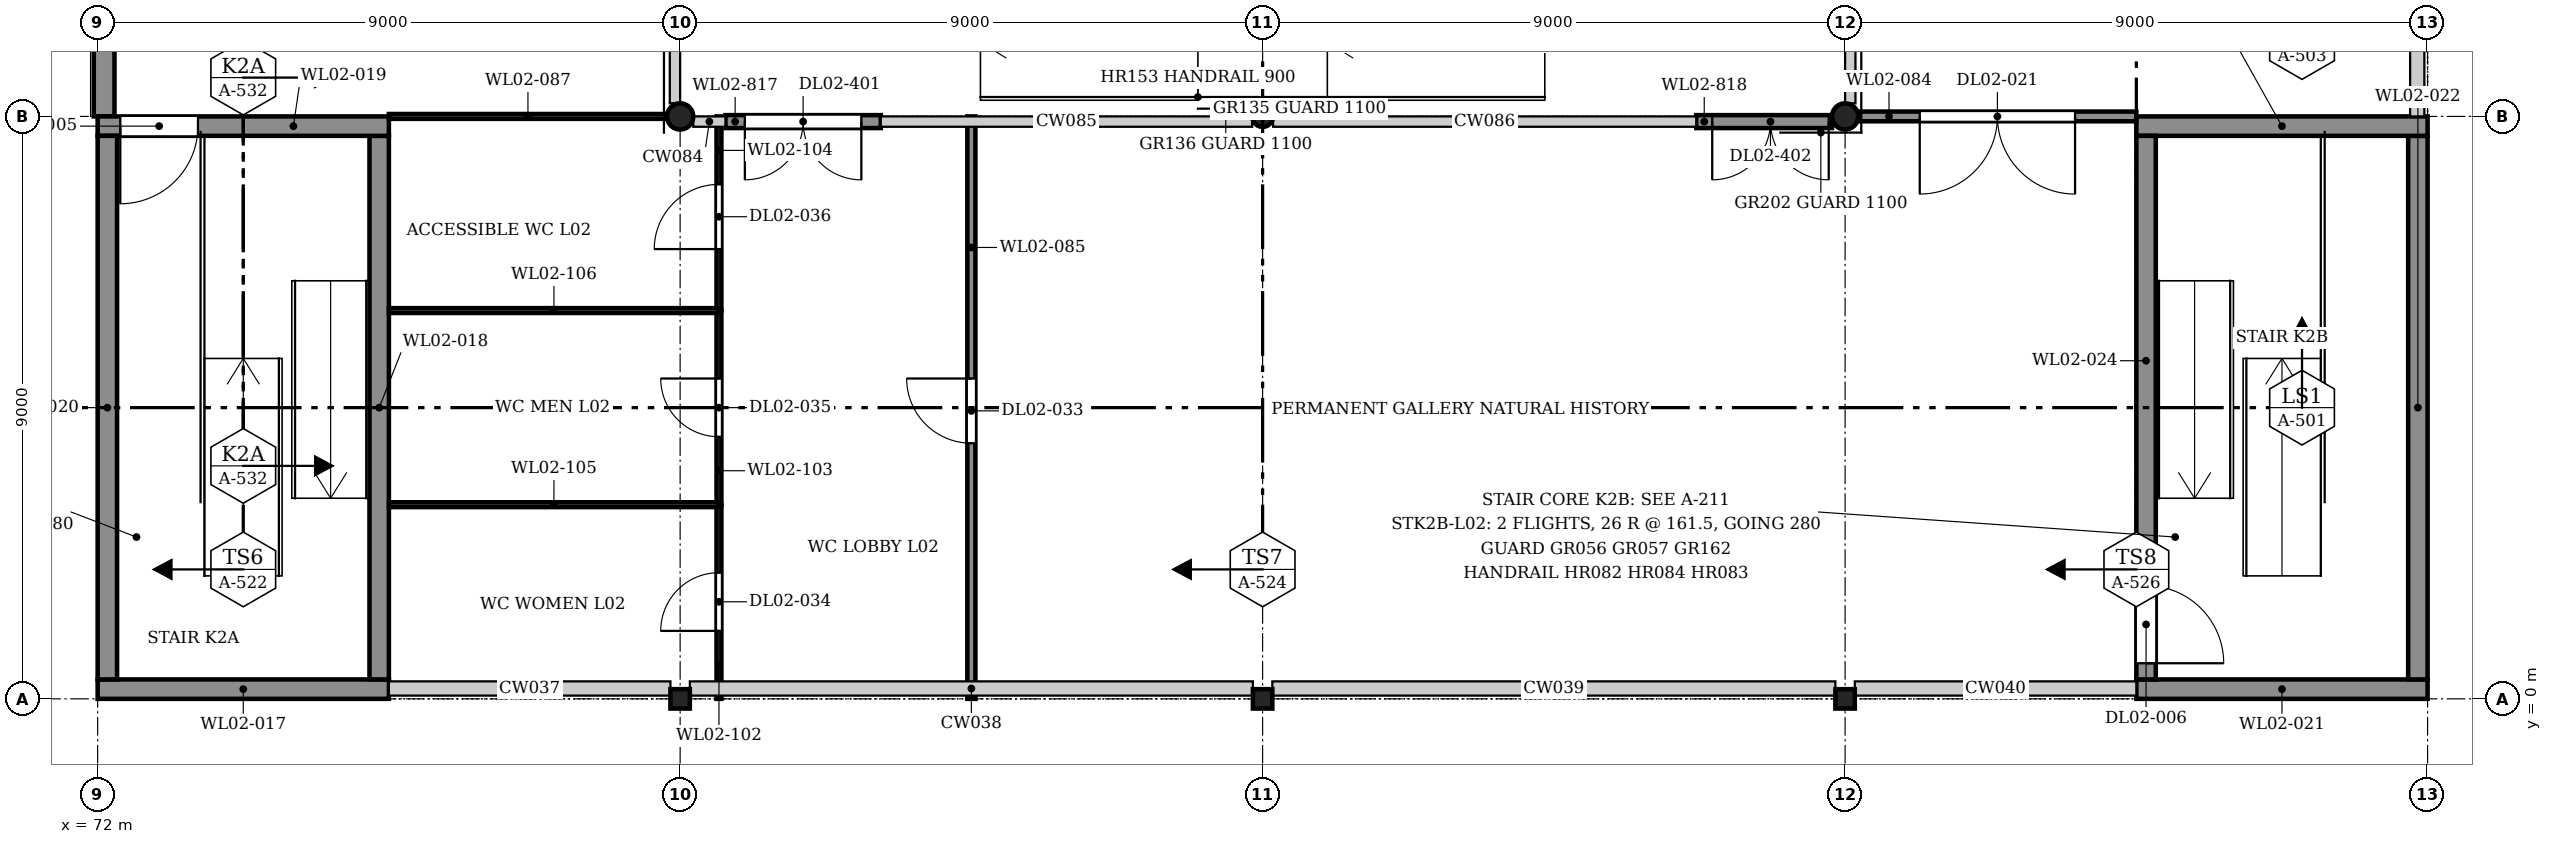
"""IFC4 building model, lengths in metres.
Left out: names, types, materials, properties, quantities, classifications, styles, units other than length and angle.
Written with IfcOpenShell. Run it as: python <this file> out.ifc"""

import sys

from ifc_helpers import new_model, si_unit, direction, frame, frame_2d, origin, origin_2d, place, context, subcontext, project, spatial, rectangle, hollow_rectangle, hollow_circle, extrude, element, fill, save


model = new_model("IFC4")
c1 = context("Model", 3, precision=1e-05, world=origin(), true_north=direction((0.0, 1.0)))
c2 = subcontext(c1, "Body", "Model", "MODEL_VIEW")
j1 = project(units=[si_unit("LENGTHUNIT", "METRE"), si_unit("PLANEANGLEUNIT", "RADIAN")], contexts=[c1])
p1 = place(None, origin())
s1 = spatial("IfcSite", under=j1, at=p1, CompositionType="ELEMENT")
p2 = place(p1, origin())
s2 = spatial("IfcBuilding", under=s1, at=p2, CompositionType="ELEMENT")
p3 = place(p2, frame((0.0, 0.0, 9.2)))
s3 = spatial("IfcBuildingStorey", under=s2, at=p3, CompositionType="ELEMENT", Elevation=9.2)
p4 = place(p3, frame((81.0, 0.0, 0.0), z_axis=(0.0, 0.0, 1.0), x_axis=(1.0, 0.0, 0.0)))
e1 = element("IfcColumn", 1, at=p4, inside=s3, PredefinedType="COLUMN", context=c2, shape_type="SweptSolid", body=[
    extrude(hollow_rectangle(XDim=0.3, YDim=0.3, WallThickness=0.016, InnerFilletRadius=0.024, OuterFilletRadius=0.04, at=origin_2d()), origin(), (0.0, 0.0, 1.0), 4.2),
])
p5 = place(p3, frame((90.0, 0.0, 0.0), z_axis=(0.0, 0.0, 1.0), x_axis=(1.0, 0.0, 0.0)))
e2 = element("IfcColumn", 2, at=p5, inside=s3, PredefinedType="COLUMN", context=c2, shape_type="SweptSolid", body=[
    extrude(hollow_rectangle(XDim=0.3, YDim=0.3, WallThickness=0.01, InnerFilletRadius=0.015, OuterFilletRadius=0.025, at=origin_2d()), origin(), (0.0, 0.0, 1.0), 4.2),
])
p6 = place(p3, frame((99.0, 0.0, 0.0), z_axis=(0.0, 0.0, 1.0), x_axis=(1.0, 0.0, 0.0)))
e3 = element("IfcColumn", 3, at=p6, inside=s3, PredefinedType="COLUMN", context=c2, shape_type="SweptSolid", body=[
    extrude(hollow_rectangle(XDim=0.3, YDim=0.3, WallThickness=0.016, InnerFilletRadius=0.024, OuterFilletRadius=0.04, at=origin_2d()), origin(), (0.0, 0.0, 1.0), 4.2),
])
p7 = place(p3, frame((81.0, 9.0, 0.0), z_axis=(0.0, 0.0, 1.0), x_axis=(1.0, 0.0, 0.0)))
e4 = element("IfcColumn", 4, at=p7, inside=s3, PredefinedType="COLUMN", context=c2, shape_type="SweptSolid", body=[
    extrude(hollow_circle(Radius=0.203, WallThickness=0.013, at=origin_2d()), origin(), (0.0, 0.0, 1.0), 4.2),
])
p8 = place(p3, frame((90.0, 9.0, 0.0), z_axis=(0.0, 0.0, 1.0), x_axis=(1.0, 0.0, 0.0)))
e5 = element("IfcColumn", 5, at=p8, inside=s3, PredefinedType="COLUMN", context=c2, shape_type="SweptSolid", body=[
    extrude(hollow_circle(Radius=0.162, WallThickness=0.01, at=origin_2d()), origin(), (0.0, 0.0, 1.0), 4.2),
])
p9 = place(p3, frame((99.0, 9.0, 0.0), z_axis=(0.0, 0.0, 1.0), x_axis=(1.0, 0.0, 0.0)))
e6 = element("IfcColumn", 6, at=p9, inside=s3, PredefinedType="COLUMN", context=c2, shape_type="SweptSolid", body=[
    extrude(hollow_circle(Radius=0.203, WallThickness=0.013, at=origin_2d()), origin(), (0.0, 0.0, 1.0), 4.2),
])
p10 = place(p3, frame((72.1, 9.0, 0.0), z_axis=(0.0, 0.0, 1.0), x_axis=(0.0, 1.0, 0.0)))
e7 = element("IfcWall", 7, at=p10, inside=s3, PredefinedType="SOLIDWALL", context=c2, shape_type="SweptSolid", body=[
    extrude(rectangle(XDim=9.0, YDim=0.32, at=frame_2d((4.5, 0.0))), origin(), (0.0, 0.0, 1.0), 4.035),
])
p11 = place(p3, frame((81.7, 8.92, 0.0), z_axis=(0.0, 0.0, 1.0), x_axis=(1.0, 0.0, 0.0)))
e8 = element("IfcWall", 8, at=p11, inside=s3, PredefinedType="SOLIDWALL", context=c2, shape_type="SweptSolid", body=[
    extrude(rectangle(XDim=2.4, YDim=0.2, at=frame_2d((1.2, 0.0))), origin(), (0.0, 0.0, 1.0), 3.125),
])
p12 = place(p11, frame((0.3, 0.0, 0.0)))
e9 = element("IfcOpeningElement", 9, at=p12, cuts=e8, PredefinedType="OPENING", context=c2, shape_type="SweptSolid", body=[
    extrude(rectangle(XDim=1.8, YDim=2.4, at=frame_2d((0.9, 1.2))), frame((0.0, 0.11, 0.0), z_axis=(0.0, -1.0, 0.0), x_axis=(1.0, 0.0, 0.0)), (0.0, 0.0, 1.0), 0.22),
])
p13 = place(p3, frame((96.7, 8.92, 0.0), z_axis=(0.0, 0.0, 1.0), x_axis=(1.0, 0.0, 0.0)))
e10 = element("IfcWall", 10, at=p13, inside=s3, PredefinedType="SOLIDWALL", context=c2, shape_type="SweptSolid", body=[
    extrude(rectangle(XDim=2.097, YDim=0.2, at=frame_2d((1.048, 0.0))), origin(), (0.0, 0.0, 1.0), 3.125),
])
p14 = place(p13, frame((0.247, 0.0, 0.0)))
e11 = element("IfcOpeningElement", 11, at=p14, cuts=e10, PredefinedType="OPENING", context=c2, shape_type="SweptSolid", body=[
    extrude(rectangle(XDim=1.8, YDim=2.4, at=frame_2d((0.9, 1.2))), frame((0.0, 0.11, 0.0), z_axis=(0.0, -1.0, 0.0), x_axis=(1.0, 0.0, 0.0)), (0.0, 0.0, 1.0), 0.22),
])
p15 = place(p3, frame((72.0, 0.15, 0.0), z_axis=(0.0, 0.0, 1.0), x_axis=(1.0, 0.0, 0.0)))
e12 = element("IfcWall", 12, at=p15, inside=s3, PredefinedType="SOLIDWALL", context=c2, shape_type="SweptSolid", body=[
    extrude(rectangle(XDim=4.5, YDim=0.3, at=frame_2d((2.25, 0.0))), origin(), (0.0, 0.0, 1.0), 4.2),
])
p16 = place(p3, frame((76.35, 0.3, 0.0), z_axis=(0.0, 0.0, 1.0), x_axis=(0.0, 1.0, 0.0)))
e13 = element("IfcWall", 13, at=p16, inside=s3, PredefinedType="SOLIDWALL", context=c2, shape_type="SweptSolid", body=[
    extrude(rectangle(XDim=8.4, YDim=0.3, at=frame_2d((4.2, 0.0))), origin(), (0.0, 0.0, 1.0), 4.2),
])
p17 = place(p3, frame((72.0, 8.85, 0.0), z_axis=(0.0, 0.0, 1.0), x_axis=(1.0, 0.0, 0.0)))
e14 = element("IfcWall", 14, at=p17, inside=s3, PredefinedType="SOLIDWALL", context=c2, shape_type="SweptSolid", body=[
    extrude(rectangle(XDim=4.5, YDim=0.3, at=frame_2d((2.25, 0.0))), origin(), (0.0, 0.0, 1.0), 4.2),
])
p18 = place(p17, frame((0.35, 0.0, 0.0)))
e15 = element("IfcOpeningElement", 15, at=p18, cuts=e14, PredefinedType="OPENING", context=c2, shape_type="SweptSolid", body=[
    extrude(rectangle(XDim=1.2, YDim=2.1, at=frame_2d((0.6, 1.05))), frame((0.0, 0.16, 0.0), z_axis=(0.0, -1.0, 0.0), x_axis=(1.0, 0.0, 0.0)), (0.0, 0.0, 1.0), 0.32),
])
p19 = place(p3, frame((72.15, 0.3, 0.0), z_axis=(0.0, 0.0, 1.0), x_axis=(0.0, 1.0, 0.0)))
e16 = element("IfcWall", 16, at=p19, inside=s3, PredefinedType="SOLIDWALL", context=c2, shape_type="SweptSolid", body=[
    extrude(rectangle(XDim=8.4, YDim=0.3, at=frame_2d((4.2, 0.0))), origin(), (0.0, 0.0, 1.0), 4.2),
])
p20 = place(p3, frame((103.5, 0.15, 0.0), z_axis=(0.0, 0.0, 1.0), x_axis=(1.0, 0.0, 0.0)))
e17 = element("IfcWall", 17, at=p20, inside=s3, PredefinedType="SOLIDWALL", context=c2, shape_type="SweptSolid", body=[
    extrude(rectangle(XDim=4.5, YDim=0.3, at=frame_2d((2.25, 0.0))), origin(), (0.0, 0.0, 1.0), 4.2),
])
p21 = place(p3, frame((107.85, 0.3, 0.0), z_axis=(0.0, 0.0, 1.0), x_axis=(0.0, 1.0, 0.0)))
e18 = element("IfcWall", 18, at=p21, inside=s3, PredefinedType="SOLIDWALL", context=c2, shape_type="SweptSolid", body=[
    extrude(rectangle(XDim=8.4, YDim=0.3, at=frame_2d((4.2, 0.0))), origin(), (0.0, 0.0, 1.0), 4.2),
])
p22 = place(p3, frame((103.5, 8.85, 0.0), z_axis=(0.0, 0.0, 1.0), x_axis=(1.0, 0.0, 0.0)))
e19 = element("IfcWall", 19, at=p22, inside=s3, PredefinedType="SOLIDWALL", context=c2, shape_type="SweptSolid", body=[
    extrude(rectangle(XDim=4.5, YDim=0.3, at=frame_2d((2.25, 0.0))), origin(), (0.0, 0.0, 1.0), 4.2),
])
p23 = place(p3, frame((103.65, 0.3, 0.0), z_axis=(0.0, 0.0, 1.0), x_axis=(0.0, 1.0, 0.0)))
e20 = element("IfcWall", 20, at=p23, inside=s3, PredefinedType="SOLIDWALL", context=c2, shape_type="SweptSolid", body=[
    extrude(rectangle(XDim=8.4, YDim=0.3, at=frame_2d((4.2, 0.0))), origin(), (0.0, 0.0, 1.0), 4.2),
])
p24 = place(p23, frame((0.25, 0.0, 0.0)))
e21 = element("IfcOpeningElement", 21, at=p24, cuts=e20, PredefinedType="OPENING", context=c2, shape_type="SweptSolid", body=[
    extrude(rectangle(XDim=1.2, YDim=2.1, at=frame_2d((0.6, 1.05))), frame((0.0, 0.16, 0.0), z_axis=(0.0, -1.0, 0.0), x_axis=(1.0, 0.0, 0.0)), (0.0, 0.0, 1.0), 0.32),
])
p25 = place(p3, frame((99.203, 9.0, 0.0), z_axis=(0.0, 0.0, 1.0), x_axis=(1.0, 0.0, 0.0)))
e22 = element("IfcWall", 22, at=p25, inside=s3, PredefinedType="PARTITIONING", context=c2, shape_type="SweptSolid", body=[
    extrude(rectangle(XDim=4.297, YDim=0.15, at=frame_2d((2.148, 0.0))), origin(), (0.0, 0.0, 1.0), 3.502),
])
p26 = place(p25, frame((0.95, 0.0, 0.0)))
e23 = element("IfcOpeningElement", 23, at=p26, cuts=e22, PredefinedType="OPENING", context=c2, shape_type="SweptSolid", body=[
    extrude(rectangle(XDim=2.4, YDim=2.4, at=frame_2d((1.2, 1.2))), frame((0.0, 0.085, 0.0), z_axis=(0.0, -1.0, 0.0), x_axis=(1.0, 0.0, 0.0)), (0.0, 0.0, 1.0), 0.17),
])
p27 = place(p3, frame((85.5, 0.0, 0.0), z_axis=(0.0, 0.0, 1.0), x_axis=(0.0, 1.0, 0.0)))
e24 = element("IfcWall", 24, at=p27, inside=s3, PredefinedType="PARTITIONING", context=c2, shape_type="SweptSolid", body=[
    extrude(rectangle(XDim=9.0, YDim=0.125, at=frame_2d((4.5, 0.0))), origin(), (0.0, 0.0, 1.0), 3.428),
])
p28 = place(p27, frame((3.95, 0.0, 0.0)))
e25 = element("IfcOpeningElement", 25, at=p28, cuts=e24, PredefinedType="OPENING", context=c2, shape_type="SweptSolid", body=[
    extrude(rectangle(XDim=1.0, YDim=2.1, at=frame_2d((0.5, 1.05))), frame((0.0, 0.073, 0.0), z_axis=(0.0, -1.0, 0.0), x_axis=(1.0, 0.0, 0.0)), (0.0, 0.0, 1.0), 0.145),
])
p29 = place(p3, frame((76.5, 9.0, 0.0), z_axis=(0.0, 0.0, 1.0), x_axis=(1.0, 0.0, 0.0)))
e26 = element("IfcWall", 26, at=p29, inside=s3, PredefinedType="PARTITIONING", context=c2, shape_type="SweptSolid", body=[
    extrude(rectangle(XDim=4.297, YDim=0.075, at=frame_2d((2.148, 0.0))), origin(), (0.0, 0.0, 1.0), 3.502),
])
p30 = place(p3, frame((81.6, 0.0, 0.0), z_axis=(0.0, 0.0, 1.0), x_axis=(0.0, 1.0, 0.0)))
e27 = element("IfcWall", 27, at=p30, inside=s3, PredefinedType="PARTITIONING", context=c2, shape_type="SweptSolid", body=[
    extrude(rectangle(XDim=3.0, YDim=0.075, at=frame_2d((1.5, 0.0))), origin(), (0.0, 0.0, 1.0), 3.578),
])
p31 = place(p30, frame((1.05, 0.0, 0.0)))
e28 = element("IfcOpeningElement", 28, at=p31, cuts=e27, PredefinedType="OPENING", context=c2, shape_type="SweptSolid", body=[
    extrude(rectangle(XDim=0.9, YDim=2.1, at=frame_2d((0.45, 1.05))), frame((0.0, 0.047, 0.0), z_axis=(0.0, -1.0, 0.0), x_axis=(1.0, 0.0, 0.0)), (0.0, 0.0, 1.0), 0.095),
])
p32 = place(p3, frame((81.6, 3.0, 0.0), z_axis=(0.0, 0.0, 1.0), x_axis=(0.0, 1.0, 0.0)))
e29 = element("IfcWall", 29, at=p32, inside=s3, PredefinedType="PARTITIONING", context=c2, shape_type="SweptSolid", body=[
    extrude(rectangle(XDim=3.0, YDim=0.075, at=frame_2d((1.5, 0.0))), origin(), (0.0, 0.0, 1.0), 4.035),
])
p33 = place(p32, frame((1.05, 0.0, 0.0)))
e30 = element("IfcOpeningElement", 30, at=p33, cuts=e29, PredefinedType="OPENING", context=c2, shape_type="SweptSolid", body=[
    extrude(rectangle(XDim=0.9, YDim=2.1, at=frame_2d((0.45, 1.05))), frame((0.0, 0.047, 0.0), z_axis=(0.0, -1.0, 0.0), x_axis=(1.0, 0.0, 0.0)), (0.0, 0.0, 1.0), 0.095),
])
p34 = place(p3, frame((81.6, 6.0, 0.0), z_axis=(0.0, 0.0, 1.0), x_axis=(0.0, 1.0, 0.0)))
e31 = element("IfcWall", 31, at=p34, inside=s3, PredefinedType="PARTITIONING", context=c2, shape_type="SweptSolid", body=[
    extrude(rectangle(XDim=3.0, YDim=0.075, at=frame_2d((1.5, 0.0))), origin(), (0.0, 0.0, 1.0), 3.428),
])
p35 = place(p34, frame((0.95, 0.0, 0.0)))
e32 = element("IfcOpeningElement", 32, at=p35, cuts=e31, PredefinedType="OPENING", context=c2, shape_type="SweptSolid", body=[
    extrude(rectangle(XDim=1.0, YDim=2.1, at=frame_2d((0.5, 1.05))), frame((0.0, 0.047, 0.0), z_axis=(0.0, -1.0, 0.0), x_axis=(1.0, 0.0, 0.0)), (0.0, 0.0, 1.0), 0.095),
])
for number, where, z_axis, x_axis in (
    (33, (76.5, 3.0, 0.0), (0.0, 0.0, 1.0), (1.0, 0.0, 0.0)),
    (34, (76.5, 6.0, 0.0), (0.0, 0.0, 1.0), (1.0, 0.0, 0.0)),
):
    element("IfcWall", number, at=place(p3, frame(where, z_axis=z_axis, x_axis=x_axis)), inside=s3, PredefinedType="PARTITIONING", context=c2, shape_type="SweptSolid", body=[
        extrude(rectangle(XDim=5.1, YDim=0.075, at=frame_2d((2.55, 0.0))), origin(), (0.0, 0.0, 1.0), 3.502),
    ])
p36 = place(p12, frame((1.8, 0.0, 0.0), z_axis=(0.0, 0.0, 1.0), x_axis=(-1.0, 0.0, 0.0)))
e35 = element("IfcDoor", 35, at=p36, inside=s3, OperationType="DOUBLE_DOOR_SINGLE_SWING", PredefinedType="DOOR", context=c2, shape_type="SweptSolid", body=[
    extrude(rectangle(XDim=1.8, YDim=2.4, at=frame_2d((0.9, 1.2))), frame((0.0, 0.025, 0.0), z_axis=(0.0, -1.0, 0.0), x_axis=(1.0, 0.0, 0.0)), (0.0, 0.0, 1.0), 0.05),
])
fill(e9, e35)
p37 = place(p14, frame((1.8, 0.0, 0.0), z_axis=(0.0, 0.0, 1.0), x_axis=(-1.0, 0.0, 0.0)))
e36 = element("IfcDoor", 36, at=p37, inside=s3, OperationType="DOUBLE_DOOR_SINGLE_SWING", PredefinedType="DOOR", context=c2, shape_type="SweptSolid", body=[
    extrude(rectangle(XDim=1.8, YDim=2.4, at=frame_2d((0.9, 1.2))), frame((0.0, 0.025, 0.0), z_axis=(0.0, -1.0, 0.0), x_axis=(1.0, 0.0, 0.0)), (0.0, 0.0, 1.0), 0.05),
])
fill(e11, e36)
p38 = place(p18, frame((1.2, 0.0, 0.0), z_axis=(0.0, 0.0, 1.0), x_axis=(-1.0, 0.0, 0.0)))
e37 = element("IfcDoor", 37, at=p38, inside=s3, OperationType="SINGLE_SWING_LEFT", PredefinedType="DOOR", context=c2, shape_type="SweptSolid", body=[
    extrude(rectangle(XDim=1.2, YDim=2.1, at=frame_2d((0.6, 1.05))), frame((0.0, 0.025, 0.0), z_axis=(0.0, -1.0, 0.0), x_axis=(1.0, 0.0, 0.0)), (0.0, 0.0, 1.0), 0.05),
])
fill(e15, e37)
p39 = place(p24, frame((1.2, 0.0, 0.0), z_axis=(0.0, 0.0, 1.0), x_axis=(-1.0, 0.0, 0.0)))
e38 = element("IfcDoor", 38, at=p39, inside=s3, OperationType="SINGLE_SWING_LEFT", PredefinedType="DOOR", context=c2, shape_type="SweptSolid", body=[
    extrude(rectangle(XDim=1.2, YDim=2.1, at=frame_2d((0.6, 1.05))), frame((0.0, 0.025, 0.0), z_axis=(0.0, -1.0, 0.0), x_axis=(1.0, 0.0, 0.0)), (0.0, 0.0, 1.0), 0.05),
])
fill(e21, e38)
p40 = place(p26, frame((2.4, 0.0, 0.0), z_axis=(0.0, 0.0, 1.0), x_axis=(-1.0, 0.0, 0.0)))
e39 = element("IfcDoor", 39, at=p40, inside=s3, OperationType="DOUBLE_DOOR_SINGLE_SWING", PredefinedType="DOOR", context=c2, shape_type="SweptSolid", body=[
    extrude(rectangle(XDim=2.4, YDim=2.4, at=frame_2d((1.2, 1.2))), frame((0.0, 0.025, 0.0), z_axis=(0.0, -1.0, 0.0), x_axis=(1.0, 0.0, 0.0)), (0.0, 0.0, 1.0), 0.05),
])
fill(e23, e39)
p41 = place(p28, origin())
e40 = element("IfcDoor", 40, at=p41, inside=s3, OperationType="SINGLE_SWING_LEFT", PredefinedType="DOOR", context=c2, shape_type="SweptSolid", body=[
    extrude(rectangle(XDim=1.0, YDim=2.1, at=frame_2d((0.5, 1.05))), frame((0.0, 0.025, 0.0), z_axis=(0.0, -1.0, 0.0), x_axis=(1.0, 0.0, 0.0)), (0.0, 0.0, 1.0), 0.05),
])
fill(e25, e40)
p42 = place(p31, origin())
e41 = element("IfcDoor", 41, at=p42, inside=s3, OperationType="SINGLE_SWING_RIGHT", PredefinedType="DOOR", context=c2, shape_type="SweptSolid", body=[
    extrude(rectangle(XDim=0.9, YDim=2.1, at=frame_2d((0.45, 1.05))), frame((0.0, 0.025, 0.0), z_axis=(0.0, -1.0, 0.0), x_axis=(1.0, 0.0, 0.0)), (0.0, 0.0, 1.0), 0.05),
])
fill(e28, e41)
p43 = place(p33, origin())
e42 = element("IfcDoor", 42, at=p43, inside=s3, OperationType="SINGLE_SWING_LEFT", PredefinedType="DOOR", context=c2, shape_type="SweptSolid", body=[
    extrude(rectangle(XDim=0.9, YDim=2.1, at=frame_2d((0.45, 1.05))), frame((0.0, 0.025, 0.0), z_axis=(0.0, -1.0, 0.0), x_axis=(1.0, 0.0, 0.0)), (0.0, 0.0, 1.0), 0.05),
])
fill(e30, e42)
p44 = place(p35, origin())
e43 = element("IfcDoor", 43, at=p44, inside=s3, OperationType="SINGLE_SWING_RIGHT", PredefinedType="DOOR", context=c2, shape_type="SweptSolid", body=[
    extrude(rectangle(XDim=1.0, YDim=2.1, at=frame_2d((0.5, 1.05))), frame((0.0, 0.025, 0.0), z_axis=(0.0, -1.0, 0.0), x_axis=(1.0, 0.0, 0.0)), (0.0, 0.0, 1.0), 0.05),
])
fill(e32, e43)
save(model, sys.argv[1])
